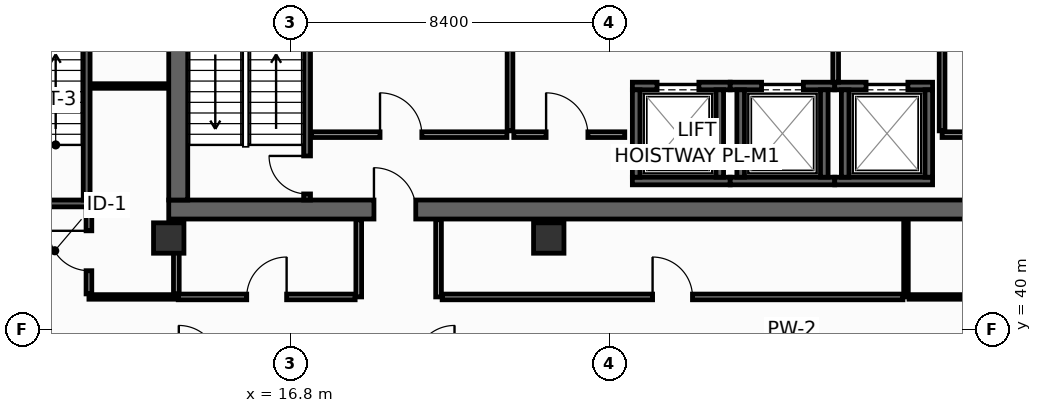
"""IFC4 building model, lengths in metres.
Left out: names, types, materials, properties, quantities, classifications, styles, units other than length and angle.
Written with IfcOpenShell. Run it as: python <this file> out.ifc"""

import sys

from ifc_helpers import new_model, si_unit, direction, frame, frame_2d, origin, origin_2d, place, context, subcontext, project, spatial, rectangle, hollow_rectangle, extrude, element, fill, save


model = new_model("IFC4")
c1 = context("Model", 3, precision=1e-05, world=origin(), true_north=direction((0.0, 1.0)))
c2 = subcontext(c1, "Body", "Model", "MODEL_VIEW")
j1 = project(units=[si_unit("LENGTHUNIT", "METRE"), si_unit("PLANEANGLEUNIT", "RADIAN")], contexts=[c1])
p1 = place(None, origin())
s1 = spatial("IfcSite", under=j1, at=p1, CompositionType="ELEMENT")
p2 = place(p1, origin())
s2 = spatial("IfcBuilding", under=s1, at=p2, CompositionType="ELEMENT")
p3 = place(p2, frame((0.0, 0.0, 201.8)))
s3 = spatial("IfcBuildingStorey", under=s2, at=p3, CompositionType="ELEMENT", Elevation=201.8)
p4 = place(p3, frame((13.6, 43.15, 0.0), z_axis=(0.0, 0.0, 1.0), x_axis=(1.0, 0.0, 0.0)))
e1 = element("IfcWall", 1, at=p4, inside=s3, PredefinedType="SHEAR", context=c2, shape_type="SweptSolid", body=[
    extrude(rectangle(XDim=32.7, YDim=0.5, at=frame_2d((16.35, 0.0))), origin(), (0.0, 0.0, 1.0), 3.55),
])
p5 = place(p4, frame((5.4, 0.0, 0.0)))
e2 = element("IfcOpeningElement", 2, at=p5, cuts=e1, PredefinedType="OPENING", context=c2, shape_type="SweptSolid", body=[
    extrude(rectangle(XDim=1.1, YDim=2.15, at=frame_2d((0.55, 1.075))), frame((0.0, 0.26, 0.0), z_axis=(0.0, -1.0, 0.0), x_axis=(1.0, 0.0, 0.0)), (0.0, 0.0, 1.0), 0.52),
])
p6 = place(p4, frame((25.6, 0.0, 0.0)))
e3 = element("IfcOpeningElement", 3, at=p6, cuts=e1, PredefinedType="OPENING", context=c2, shape_type="SweptSolid", body=[
    extrude(rectangle(XDim=1.1, YDim=2.15, at=frame_2d((0.55, 1.075))), frame((0.0, 0.26, 0.0), z_axis=(0.0, -1.0, 0.0), x_axis=(1.0, 0.0, 0.0)), (0.0, 0.0, 1.0), 0.52),
])
p7 = place(p3, frame((13.85, 43.4, 0.0), z_axis=(0.0, 0.0, 1.0), x_axis=(0.0, 1.0, 0.0)))
e4 = element("IfcWall", 4, at=p7, inside=s3, PredefinedType="SHEAR", context=c2, shape_type="SweptSolid", body=[
    extrude(rectangle(XDim=10.4, YDim=0.5, at=frame_2d((5.2, 0.0))), origin(), (0.0, 0.0, 1.0), 3.55),
])
for number, where, z_axis, x_axis in (
    (5, (13.6, 42.4, 0.0), (0.0, 0.0, 1.0), (1.0, 0.0, 0.0)),
    (6, (23.6, 42.4, 0.0), (0.0, 0.0, 1.0), (1.0, 0.0, 0.0)),
):
    element("IfcColumn", number, at=place(p3, frame(where, z_axis=z_axis, x_axis=x_axis)), inside=s3, PredefinedType="COLUMN", context=c2, shape_type="SweptSolid", body=[
        extrude(hollow_rectangle(XDim=0.8, YDim=0.8, WallThickness=0.036, at=origin_2d()), origin(), (0.0, 0.0, 1.0), 3.8),
    ])
p8 = place(p3, frame((25.8, 43.9, 0.0), z_axis=(0.0, 0.0, 1.0), x_axis=(1.0, 0.0, 0.0)))
e7 = element("IfcWall", 7, at=p8, inside=s3, PredefinedType="SHEAR", context=c2, shape_type="SweptSolid", body=[
    extrude(rectangle(XDim=2.575, YDim=0.2, at=frame_2d((1.288, 0.0))), origin(), (0.0, 0.0, 1.0), 3.55),
])
p9 = place(p3, frame((25.8, 46.4, 0.0), z_axis=(0.0, 0.0, 1.0), x_axis=(1.0, 0.0, 0.0)))
e8 = element("IfcWall", 8, at=p9, inside=s3, PredefinedType="SHEAR", context=c2, shape_type="SweptSolid", body=[
    extrude(rectangle(XDim=2.575, YDim=0.2, at=frame_2d((1.288, 0.0))), origin(), (0.0, 0.0, 1.0), 3.55),
])
p10 = place(p9, frame((0.65, 0.0, 0.0)))
e9 = element("IfcOpeningElement", 9, at=p10, cuts=e8, PredefinedType="OPENING", context=c2, shape_type="SweptSolid", body=[
    extrude(rectangle(XDim=1.1, YDim=2.2, at=frame_2d((0.55, 1.1))), frame((0.0, 0.11, 0.0), z_axis=(0.0, -1.0, 0.0), x_axis=(1.0, 0.0, 0.0)), (0.0, 0.0, 1.0), 0.22),
])
for number, where, z_axis, x_axis in (
    (10, (25.9, 44.0, 0.0), (0.0, 0.0, 1.0), (0.0, 1.0, 0.0)),
    (11, (28.1, 44.0, 0.0), (0.0, 0.0, 1.0), (0.0, 1.0, 0.0)),
):
    element("IfcWall", number, at=place(p3, frame(where, z_axis=z_axis, x_axis=x_axis)), inside=s3, PredefinedType="SHEAR", context=c2, shape_type="SweptSolid", body=[
        extrude(rectangle(XDim=2.3, YDim=0.2, at=frame_2d((1.15, 0.0))), origin(), (0.0, 0.0, 1.0), 3.55),
    ])
p11 = place(p3, frame((28.375, 43.9, 0.0), z_axis=(0.0, 0.0, 1.0), x_axis=(1.0, 0.0, 0.0)))
e12 = element("IfcWall", 12, at=p11, inside=s3, PredefinedType="SHEAR", context=c2, shape_type="SweptSolid", body=[
    extrude(rectangle(XDim=2.75, YDim=0.2, at=frame_2d((1.375, 0.0))), origin(), (0.0, 0.0, 1.0), 3.55),
])
p12 = place(p3, frame((28.375, 46.4, 0.0), z_axis=(0.0, 0.0, 1.0), x_axis=(1.0, 0.0, 0.0)))
e13 = element("IfcWall", 13, at=p12, inside=s3, PredefinedType="SHEAR", context=c2, shape_type="SweptSolid", body=[
    extrude(rectangle(XDim=2.75, YDim=0.2, at=frame_2d((1.375, 0.0))), origin(), (0.0, 0.0, 1.0), 3.55),
])
p13 = place(p12, frame((0.825, 0.0, 0.0)))
e14 = element("IfcOpeningElement", 14, at=p13, cuts=e13, PredefinedType="OPENING", context=c2, shape_type="SweptSolid", body=[
    extrude(rectangle(XDim=1.1, YDim=2.2, at=frame_2d((0.55, 1.1))), frame((0.0, 0.11, 0.0), z_axis=(0.0, -1.0, 0.0), x_axis=(1.0, 0.0, 0.0)), (0.0, 0.0, 1.0), 0.22),
])
for number, where, z_axis, x_axis in (
    (15, (28.65, 44.0, 0.0), (0.0, 0.0, 1.0), (0.0, 1.0, 0.0)),
    (16, (30.85, 44.0, 0.0), (0.0, 0.0, 1.0), (0.0, 1.0, 0.0)),
):
    element("IfcWall", number, at=place(p3, frame(where, z_axis=z_axis, x_axis=x_axis)), inside=s3, PredefinedType="SHEAR", context=c2, shape_type="SweptSolid", body=[
        extrude(rectangle(XDim=2.3, YDim=0.2, at=frame_2d((1.15, 0.0))), origin(), (0.0, 0.0, 1.0), 3.55),
    ])
p14 = place(p3, frame((31.125, 43.9, 0.0), z_axis=(0.0, 0.0, 1.0), x_axis=(1.0, 0.0, 0.0)))
e17 = element("IfcWall", 17, at=p14, inside=s3, PredefinedType="SHEAR", context=c2, shape_type="SweptSolid", body=[
    extrude(rectangle(XDim=2.575, YDim=0.2, at=frame_2d((1.288, 0.0))), origin(), (0.0, 0.0, 1.0), 3.55),
])
p15 = place(p3, frame((31.125, 46.4, 0.0), z_axis=(0.0, 0.0, 1.0), x_axis=(1.0, 0.0, 0.0)))
e18 = element("IfcWall", 18, at=p15, inside=s3, PredefinedType="SHEAR", context=c2, shape_type="SweptSolid", body=[
    extrude(rectangle(XDim=2.575, YDim=0.2, at=frame_2d((1.288, 0.0))), origin(), (0.0, 0.0, 1.0), 3.55),
])
p16 = place(p15, frame((0.825, 0.0, 0.0)))
e19 = element("IfcOpeningElement", 19, at=p16, cuts=e18, PredefinedType="OPENING", context=c2, shape_type="SweptSolid", body=[
    extrude(rectangle(XDim=1.1, YDim=2.2, at=frame_2d((0.55, 1.1))), frame((0.0, 0.11, 0.0), z_axis=(0.0, -1.0, 0.0), x_axis=(1.0, 0.0, 0.0)), (0.0, 0.0, 1.0), 0.22),
])
for number, where, z_axis, x_axis in (
    (20, (31.4, 44.0, 0.0), (0.0, 0.0, 1.0), (0.0, 1.0, 0.0)),
    (21, (33.6, 44.0, 0.0), (0.0, 0.0, 1.0), (0.0, 1.0, 0.0)),
):
    element("IfcWall", number, at=place(p3, frame(where, z_axis=z_axis, x_axis=x_axis)), inside=s3, PredefinedType="SHEAR", context=c2, shape_type="SweptSolid", body=[
        extrude(rectangle(XDim=2.3, YDim=0.2, at=frame_2d((1.15, 0.0))), origin(), (0.0, 0.0, 1.0), 3.55),
    ])
p17 = place(p3, frame((17.24, 43.4, 0.0), z_axis=(0.0, 0.0, 1.0), x_axis=(0.0, 1.0, 0.0)))
e22 = element("IfcWall", 22, at=p17, inside=s3, PredefinedType="SHEAR", context=c2, shape_type="SweptSolid", body=[
    extrude(rectangle(XDim=10.4, YDim=0.18, at=frame_2d((5.2, 0.0))), origin(), (0.0, 0.0, 1.0), 3.55),
])
p18 = place(p17, frame((0.16, 0.0, 0.0)))
e23 = element("IfcOpeningElement", 23, at=p18, cuts=e22, PredefinedType="OPENING", context=c2, shape_type="SweptSolid", body=[
    extrude(rectangle(XDim=1.0, YDim=2.15, at=frame_2d((0.5, 1.075))), frame((0.0, 0.1, 0.0), z_axis=(0.0, -1.0, 0.0), x_axis=(1.0, 0.0, 0.0)), (0.0, 0.0, 1.0), 0.2),
])
p19 = place(p3, frame((8.12, 43.31, 0.0), z_axis=(0.0, 0.0, 1.0), x_axis=(1.0, 0.0, 0.0)))
e24 = element("IfcWall", 24, at=p19, inside=s3, PredefinedType="SHEAR", context=c2, shape_type="SweptSolid", body=[
    extrude(rectangle(XDim=3.41, YDim=0.18, at=frame_2d((1.705, 0.0))), origin(), (0.0, 0.0, 1.0), 3.55),
])
p20 = place(p19, frame((1.15, 0.0, 0.0)))
e25 = element("IfcOpeningElement", 25, at=p20, cuts=e24, PredefinedType="OPENING", context=c2, shape_type="SweptSolid", body=[
    extrude(rectangle(XDim=1.1, YDim=2.15, at=frame_2d((0.55, 1.075))), frame((0.0, 0.1, 0.0), z_axis=(0.0, -1.0, 0.0), x_axis=(1.0, 0.0, 0.0)), (0.0, 0.0, 1.0), 0.2),
])
p21 = place(p3, frame((11.44, 43.4, 0.0), z_axis=(0.0, 0.0, 1.0), x_axis=(0.0, 1.0, 0.0)))
e26 = element("IfcWall", 26, at=p21, inside=s3, PredefinedType="SHEAR", context=c2, shape_type="SweptSolid", body=[
    extrude(rectangle(XDim=10.4, YDim=0.18, at=frame_2d((5.2, 0.0))), origin(), (0.0, 0.0, 1.0), 3.55),
])
p22 = place(p3, frame((17.36, 45.12, 0.0), z_axis=(0.0, 0.0, 1.0), x_axis=(1.0, 0.0, 0.0)))
e27 = element("IfcWall", 27, at=p22, inside=s3, PredefinedType="PARTITIONING", context=c2, shape_type="SweptSolid", body=[
    extrude(rectangle(XDim=5.14, YDim=0.15, at=frame_2d((2.57, 0.0))), origin(), (0.0, 0.0, 1.0), 3.55),
])
p23 = place(p22, frame((1.8, 0.0, 0.0)))
e28 = element("IfcOpeningElement", 28, at=p23, cuts=e27, PredefinedType="OPENING", context=c2, shape_type="SweptSolid", body=[
    extrude(rectangle(XDim=1.1, YDim=2.15, at=frame_2d((0.55, 1.075))), frame((0.0, 0.085, 0.0), z_axis=(0.0, -1.0, 0.0), x_axis=(1.0, 0.0, 0.0)), (0.0, 0.0, 1.0), 0.17),
])
p24 = place(p3, frame((22.58, 50.55, 0.0), z_axis=(0.0, 0.0, 1.0), x_axis=(0.0, -1.0, 0.0)))
e29 = element("IfcWall", 29, at=p24, inside=s3, PredefinedType="PARTITIONING", context=c2, shape_type="SweptSolid", body=[
    extrude(rectangle(XDim=5.33, YDim=0.15, at=frame_2d((2.665, 0.0))), origin(), (0.0, 0.0, 1.0), 3.55),
])
p25 = place(p24, frame((1.8, 0.0, 0.0)))
e30 = element("IfcOpeningElement", 30, at=p25, cuts=e29, PredefinedType="OPENING", context=c2, shape_type="SweptSolid", body=[
    extrude(rectangle(XDim=1.1, YDim=2.15, at=frame_2d((0.55, 1.075))), frame((0.0, 0.085, 0.0), z_axis=(0.0, -1.0, 0.0), x_axis=(1.0, 0.0, 0.0)), (0.0, 0.0, 1.0), 0.17),
])
p26 = place(p3, frame((22.68, 45.12, 0.0), z_axis=(0.0, 0.0, 1.0), x_axis=(1.0, 0.0, 0.0)))
e31 = element("IfcWall", 31, at=p26, inside=s3, PredefinedType="PARTITIONING", context=c2, shape_type="SweptSolid", body=[
    extrude(rectangle(XDim=2.92, YDim=0.15, at=frame_2d((1.46, 0.0))), origin(), (0.0, 0.0, 1.0), 3.55),
])
p27 = place(p26, frame((0.85, 0.0, 0.0)))
e32 = element("IfcOpeningElement", 32, at=p27, cuts=e31, PredefinedType="OPENING", context=c2, shape_type="SweptSolid", body=[
    extrude(rectangle(XDim=1.1, YDim=2.15, at=frame_2d((0.55, 1.075))), frame((0.0, 0.085, 0.0), z_axis=(0.0, -1.0, 0.0), x_axis=(1.0, 0.0, 0.0)), (0.0, 0.0, 1.0), 0.17),
])
p28 = place(p3, frame((31.15, 46.5, 0.0), z_axis=(0.0, 0.0, 1.0), x_axis=(0.0, 1.0, 0.0)))
e33 = element("IfcWall", 33, at=p28, inside=s3, PredefinedType="PARTITIONING", context=c2, shape_type="SweptSolid", body=[
    extrude(rectangle(XDim=4.35, YDim=0.15, at=frame_2d((2.175, 0.0))), origin(), (0.0, 0.0, 1.0), 3.55),
])
p29 = place(p28, frame((1.5, 0.0, 0.0)))
e34 = element("IfcOpeningElement", 34, at=p29, cuts=e33, PredefinedType="OPENING", context=c2, shape_type="SweptSolid", body=[
    extrude(rectangle(XDim=1.05, YDim=2.15, at=frame_2d((0.525, 1.075))), frame((0.0, 0.085, 0.0), z_axis=(0.0, -1.0, 0.0), x_axis=(1.0, 0.0, 0.0)), (0.0, 0.0, 1.0), 0.17),
])
p30 = place(p3, frame((33.95, 45.12, 0.0), z_axis=(0.0, 0.0, 1.0), x_axis=(1.0, 0.0, 0.0)))
e35 = element("IfcWall", 35, at=p30, inside=s3, PredefinedType="PARTITIONING", context=c2, shape_type="SweptSolid", body=[
    extrude(rectangle(XDim=8.55, YDim=0.15, at=frame_2d((4.275, 0.0))), origin(), (0.0, 0.0, 1.0), 3.55),
])
p31 = place(p30, frame((0.95, 0.0, 0.0)))
e36 = element("IfcOpeningElement", 36, at=p31, cuts=e35, PredefinedType="OPENING", context=c2, shape_type="SweptSolid", body=[
    extrude(rectangle(XDim=0.95, YDim=2.15, at=frame_2d((0.475, 1.075))), frame((0.0, 0.085, 0.0), z_axis=(0.0, -1.0, 0.0), x_axis=(1.0, 0.0, 0.0)), (0.0, 0.0, 1.0), 0.17),
])
p32 = place(p30, frame((3.8, 0.0, 0.0)))
e37 = element("IfcOpeningElement", 37, at=p32, cuts=e35, PredefinedType="OPENING", context=c2, shape_type="SweptSolid", body=[
    extrude(rectangle(XDim=0.95, YDim=2.15, at=frame_2d((0.475, 1.075))), frame((0.0, 0.085, 0.0), z_axis=(0.0, -1.0, 0.0), x_axis=(1.0, 0.0, 0.0)), (0.0, 0.0, 1.0), 0.17),
])
p33 = place(p30, frame((6.65, 0.0, 0.0)))
e38 = element("IfcOpeningElement", 38, at=p33, cuts=e35, PredefinedType="OPENING", context=c2, shape_type="SweptSolid", body=[
    extrude(rectangle(XDim=0.95, YDim=2.15, at=frame_2d((0.475, 1.075))), frame((0.0, 0.085, 0.0), z_axis=(0.0, -1.0, 0.0), x_axis=(1.0, 0.0, 0.0)), (0.0, 0.0, 1.0), 0.17),
])
p34 = place(p3, frame((33.95, 45.22, 0.0), z_axis=(0.0, 0.0, 1.0), x_axis=(0.0, 1.0, 0.0)))
e39 = element("IfcWall", 39, at=p34, inside=s3, PredefinedType="PARTITIONING", context=c2, shape_type="SweptSolid", body=[
    extrude(rectangle(XDim=2.33, YDim=0.15, at=frame_2d((1.165, 0.0))), origin(), (0.0, 0.0, 1.0), 3.55),
])
p35 = place(p3, frame((11.5, 40.85, 0.0), z_axis=(0.0, 0.0, 1.0), x_axis=(1.0, 0.0, 0.0)))
e40 = element("IfcWall", 40, at=p35, inside=s3, PredefinedType="PARTITIONING", context=c2, shape_type="SweptSolid", body=[
    extrude(rectangle(XDim=2.35, YDim=0.12, at=frame_2d((1.175, 0.0))), origin(), (0.0, 0.0, 1.0), 3.55),
])
p36 = place(p3, frame((11.55, 46.4, 0.0), z_axis=(0.0, 0.0, 1.0), x_axis=(1.0, 0.0, 0.0)))
e41 = element("IfcWall", 41, at=p36, inside=s3, PredefinedType="PARTITIONING", context=c2, shape_type="SweptSolid", body=[
    extrude(rectangle(XDim=2.03, YDim=0.12, at=frame_2d((1.015, 0.0))), origin(), (0.0, 0.0, 1.0), 3.55),
])
p37 = place(p3, frame((11.5, 40.93, 0.0), z_axis=(0.0, 0.0, 1.0), x_axis=(0.0, 1.0, 0.0)))
e42 = element("IfcWall", 42, at=p37, inside=s3, PredefinedType="PARTITIONING", context=c2, shape_type="SweptSolid", body=[
    extrude(rectangle(XDim=2.27, YDim=0.15, at=frame_2d((1.135, 0.0))), origin(), (0.0, 0.0, 1.0), 2.835),
])
p38 = place(p37, frame((0.61, 0.0, 0.0)))
e43 = element("IfcOpeningElement", 43, at=p38, cuts=e42, PredefinedType="OPENING", context=c2, shape_type="SweptSolid", body=[
    extrude(rectangle(XDim=1.05, YDim=2.15, at=frame_2d((0.525, 1.075))), frame((0.0, 0.085, 0.0), z_axis=(0.0, -1.0, 0.0), x_axis=(1.0, 0.0, 0.0)), (0.0, 0.0, 1.0), 0.17),
])
p39 = place(p3, frame((13.8, 40.93, 0.0), z_axis=(0.0, 0.0, 1.0), x_axis=(0.0, 1.0, 0.0)))
e44 = element("IfcWall", 44, at=p39, inside=s3, PredefinedType="PARTITIONING", context=c2, shape_type="SweptSolid", body=[
    extrude(rectangle(XDim=1.95, YDim=0.15, at=frame_2d((0.975, 0.0))), origin(), (0.0, 0.0, 1.0), 3.55),
])
for number, where, z_axis, x_axis in (
    (45, (18.6, 40.85, 0.0), (0.0, 0.0, 1.0), (0.0, 1.0, 0.0)),
    (46, (20.7, 40.85, 0.0), (0.0, 0.0, 1.0), (0.0, 1.0, 0.0)),
):
    element("IfcWall", number, at=place(p3, frame(where, z_axis=z_axis, x_axis=x_axis)), inside=s3, PredefinedType="PARTITIONING", context=c2, shape_type="SweptSolid", body=[
        extrude(rectangle(XDim=2.03, YDim=0.15, at=frame_2d((1.015, 0.0))), origin(), (0.0, 0.0, 1.0), 3.55),
    ])
p40 = place(p3, frame((13.85, 40.85, 0.0), z_axis=(0.0, 0.0, 1.0), x_axis=(1.0, 0.0, 0.0)))
e47 = element("IfcWall", 47, at=p40, inside=s3, PredefinedType="PARTITIONING", context=c2, shape_type="SweptSolid", body=[
    extrude(rectangle(XDim=4.655, YDim=0.15, at=frame_2d((2.327, 0.0))), origin(), (0.0, 0.0, 1.0), 3.55),
])
p41 = place(p40, frame((1.802, 0.0, 0.0)))
e48 = element("IfcOpeningElement", 48, at=p41, cuts=e47, PredefinedType="OPENING", context=c2, shape_type="SweptSolid", body=[
    extrude(rectangle(XDim=1.05, YDim=2.15, at=frame_2d((0.525, 1.075))), frame((0.0, 0.085, 0.0), z_axis=(0.0, -1.0, 0.0), x_axis=(1.0, 0.0, 0.0)), (0.0, 0.0, 1.0), 0.17),
])
p42 = place(p3, frame((33.0, 40.85, 0.0), z_axis=(0.0, 0.0, 1.0), x_axis=(0.0, 1.0, 0.0)))
e49 = element("IfcWall", 49, at=p42, inside=s3, PredefinedType="PARTITIONING", context=c2, shape_type="SweptSolid", body=[
    extrude(rectangle(XDim=2.03, YDim=0.12, at=frame_2d((1.015, 0.0))), origin(), (0.0, 0.0, 1.0), 2.835),
])
p43 = place(p3, frame((20.795, 40.85, 0.0), z_axis=(0.0, 0.0, 1.0), x_axis=(1.0, 0.0, 0.0)))
e50 = element("IfcWall", 50, at=p43, inside=s3, PredefinedType="PARTITIONING", context=c2, shape_type="SweptSolid", body=[
    extrude(rectangle(XDim=12.125, YDim=0.15, at=frame_2d((6.062, 0.0))), origin(), (0.0, 0.0, 1.0), 2.835),
])
p44 = place(p43, frame((5.537, 0.0, 0.0)))
e51 = element("IfcOpeningElement", 51, at=p44, cuts=e50, PredefinedType="OPENING", context=c2, shape_type="SweptSolid", body=[
    extrude(rectangle(XDim=1.05, YDim=2.15, at=frame_2d((0.525, 1.075))), frame((0.0, 0.085, 0.0), z_axis=(0.0, -1.0, 0.0), x_axis=(1.0, 0.0, 0.0)), (0.0, 0.0, 1.0), 0.17),
])
p45 = place(p3, frame((33.08, 40.85, 0.0), z_axis=(0.0, 0.0, 1.0), x_axis=(1.0, 0.0, 0.0)))
e52 = element("IfcWall", 52, at=p45, inside=s3, PredefinedType="PARTITIONING", context=c2, shape_type="SweptSolid", body=[
    extrude(rectangle(XDim=5.625, YDim=0.12, at=frame_2d((2.812, 0.0))), origin(), (0.0, 0.0, 1.0), 2.835),
])
p46 = place(p45, frame((1.702, 0.0, 0.0)))
e53 = element("IfcOpeningElement", 53, at=p46, cuts=e52, PredefinedType="OPENING", context=c2, shape_type="SweptSolid", body=[
    extrude(rectangle(XDim=0.9, YDim=2.1, at=frame_2d((0.45, 1.05))), frame((0.0, 0.07, 0.0), z_axis=(0.0, -1.0, 0.0), x_axis=(1.0, 0.0, 0.0)), (0.0, 0.0, 1.0), 0.14),
])
p47 = place(p10, origin())
e54 = element("IfcDoor", 54, at=p47, inside=s3, OperationType="SLIDING_TO_LEFT", PredefinedType="DOOR", context=c2, shape_type="SweptSolid", body=[
    extrude(rectangle(XDim=1.1, YDim=2.2, at=frame_2d((0.55, 1.1))), frame((0.0, 0.025, 0.0), z_axis=(0.0, -1.0, 0.0), x_axis=(1.0, 0.0, 0.0)), (0.0, 0.0, 1.0), 0.05),
])
fill(e9, e54)
p48 = place(p13, origin())
e55 = element("IfcDoor", 55, at=p48, inside=s3, OperationType="SLIDING_TO_LEFT", PredefinedType="DOOR", context=c2, shape_type="SweptSolid", body=[
    extrude(rectangle(XDim=1.1, YDim=2.2, at=frame_2d((0.55, 1.1))), frame((0.0, 0.025, 0.0), z_axis=(0.0, -1.0, 0.0), x_axis=(1.0, 0.0, 0.0)), (0.0, 0.0, 1.0), 0.05),
])
fill(e14, e55)
p49 = place(p16, origin())
e56 = element("IfcDoor", 56, at=p49, inside=s3, OperationType="SLIDING_TO_LEFT", PredefinedType="DOOR", context=c2, shape_type="SweptSolid", body=[
    extrude(rectangle(XDim=1.1, YDim=2.2, at=frame_2d((0.55, 1.1))), frame((0.0, 0.025, 0.0), z_axis=(0.0, -1.0, 0.0), x_axis=(1.0, 0.0, 0.0)), (0.0, 0.0, 1.0), 0.05),
])
fill(e19, e56)
p50 = place(p18, origin())
e57 = element("IfcDoor", 57, at=p50, inside=s3, OperationType="SINGLE_SWING_RIGHT", PredefinedType="DOOR", context=c2, shape_type="SweptSolid", body=[
    extrude(rectangle(XDim=1.0, YDim=2.15, at=frame_2d((0.5, 1.075))), frame((0.0, 0.025, 0.0), z_axis=(0.0, -1.0, 0.0), x_axis=(1.0, 0.0, 0.0)), (0.0, 0.0, 1.0), 0.05),
])
fill(e23, e57)
p51 = place(p23, origin())
e58 = element("IfcDoor", 58, at=p51, inside=s3, OperationType="SINGLE_SWING_LEFT", PredefinedType="DOOR", context=c2, shape_type="SweptSolid", body=[
    extrude(rectangle(XDim=1.1, YDim=2.15, at=frame_2d((0.55, 1.075))), frame((0.0, 0.025, 0.0), z_axis=(0.0, -1.0, 0.0), x_axis=(1.0, 0.0, 0.0)), (0.0, 0.0, 1.0), 0.05),
])
fill(e28, e58)
p52 = place(p27, origin())
e59 = element("IfcDoor", 59, at=p52, inside=s3, OperationType="SINGLE_SWING_LEFT", PredefinedType="DOOR", context=c2, shape_type="SweptSolid", body=[
    extrude(rectangle(XDim=1.1, YDim=2.15, at=frame_2d((0.55, 1.075))), frame((0.0, 0.025, 0.0), z_axis=(0.0, -1.0, 0.0), x_axis=(1.0, 0.0, 0.0)), (0.0, 0.0, 1.0), 0.05),
])
fill(e32, e59)
p53 = place(p5, origin())
e60 = element("IfcDoor", 60, at=p53, inside=s3, OperationType="SINGLE_SWING_LEFT", PredefinedType="DOOR", context=c2, shape_type="SweptSolid", body=[
    extrude(rectangle(XDim=1.1, YDim=2.15, at=frame_2d((0.55, 1.075))), frame((0.0, 0.025, 0.0), z_axis=(0.0, -1.0, 0.0), x_axis=(1.0, 0.0, 0.0)), (0.0, 0.0, 1.0), 0.05),
])
fill(e2, e60)
p54 = place(p38, origin())
e61 = element("IfcDoor", 61, at=p54, inside=s3, OperationType="SINGLE_SWING_RIGHT", PredefinedType="DOOR", context=c2, shape_type="SweptSolid", body=[
    extrude(rectangle(XDim=1.05, YDim=2.15, at=frame_2d((0.525, 1.075))), frame((0.0, 0.025, 0.0), z_axis=(0.0, -1.0, 0.0), x_axis=(1.0, 0.0, 0.0)), (0.0, 0.0, 1.0), 0.05),
])
fill(e43, e61)
p55 = place(p41, origin())
e62 = element("IfcDoor", 62, at=p55, inside=s3, OperationType="SINGLE_SWING_RIGHT", PredefinedType="DOOR", context=c2, shape_type="SweptSolid", body=[
    extrude(rectangle(XDim=1.05, YDim=2.15, at=frame_2d((0.525, 1.075))), frame((0.0, 0.025, 0.0), z_axis=(0.0, -1.0, 0.0), x_axis=(1.0, 0.0, 0.0)), (0.0, 0.0, 1.0), 0.05),
])
fill(e48, e62)
p56 = place(p44, origin())
e63 = element("IfcDoor", 63, at=p56, inside=s3, OperationType="SINGLE_SWING_LEFT", PredefinedType="DOOR", context=c2, shape_type="SweptSolid", body=[
    extrude(rectangle(XDim=1.05, YDim=2.15, at=frame_2d((0.525, 1.075))), frame((0.0, 0.025, 0.0), z_axis=(0.0, -1.0, 0.0), x_axis=(1.0, 0.0, 0.0)), (0.0, 0.0, 1.0), 0.05),
])
fill(e51, e63)
save(model, sys.argv[1])
